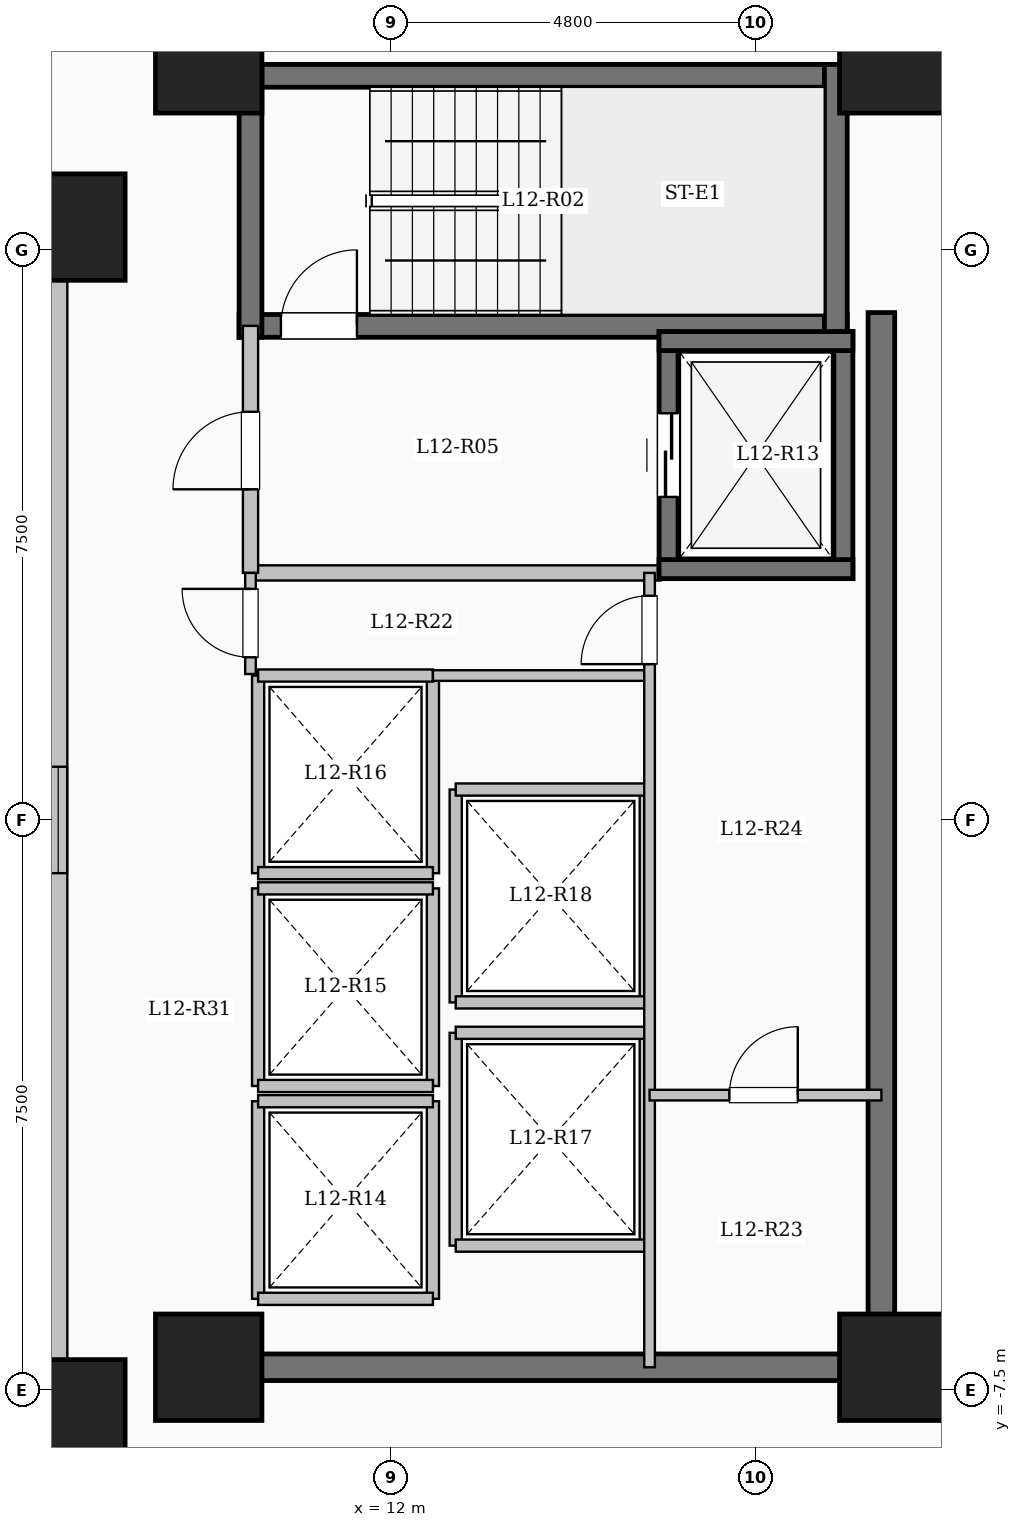
"""IFC4 building model, lengths in metres.
Left out: names, types, materials, properties, quantities, classifications, styles, units other than length and angle.
Written with IfcOpenShell. Run it as: python <this file> out.ifc"""

import sys

from ifc_helpers import new_model, si_unit, direction, frame, frame_2d, origin, origin_2d, place, context, subcontext, project, spatial, rectangle, extrude, element, fill, save


model = new_model("IFC4")
c1 = context("Model", 3, precision=1e-05, world=origin(), true_north=direction((0.0, 1.0)))
c2 = subcontext(c1, "Body", "Model", "MODEL_VIEW")
j1 = project(units=[si_unit("LENGTHUNIT", "METRE"), si_unit("PLANEANGLEUNIT", "RADIAN")], contexts=[c1])
p1 = place(None, origin())
s1 = spatial("IfcSite", under=j1, at=p1, CompositionType="ELEMENT")
p2 = place(p1, origin())
s2 = spatial("IfcBuilding", under=s1, at=p2, CompositionType="ELEMENT")
p3 = place(p2, frame((0.0, 0.0, 47.45)))
s3 = spatial("IfcBuildingStorey", under=s2, at=p3, CompositionType="ELEMENT", Elevation=47.45)
for number, where, z_axis, x_axis in (
    (1, (7.8, -7.8, 0.0), (0.0, 0.0, 1.0), (1.0, 0.0, 0.0)),
    (2, (7.8, 7.8, 0.0), (0.0, 0.0, 1.0), (1.0, 0.0, 0.0)),
    (3, (9.6, -7.2, 0.0), (0.0, 0.0, 1.0), (1.0, 0.0, 0.0)),
    (4, (9.6, 10.0, 0.0), (0.0, 0.0, 1.0), (1.0, 0.0, 0.0)),
    (5, (18.6, -7.2, 0.0), (0.0, 0.0, 1.0), (1.0, 0.0, 0.0)),
    (6, (18.6, 10.0, 0.0), (0.0, 0.0, 1.0), (1.0, 0.0, 0.0)),
):
    element("IfcColumn", number, at=place(p3, frame(where, z_axis=z_axis, x_axis=x_axis)), inside=s3, PredefinedType="COLUMN", context=c2, shape_type="SweptSolid", body=[
        extrude(rectangle(XDim=1.4, YDim=1.4, at=origin_2d()), origin(), (0.0, 0.0, 1.0), 3.35),
    ])
p4 = place(p3, frame((-7.62, -7.62, 0.0), z_axis=(0.0, 0.0, 1.0), x_axis=(1.0, 0.0, 0.0)))
e7 = element("IfcWall", 7, at=p4, inside=s3, PredefinedType="SOLIDWALL", context=c2, shape_type="SweptSolid", body=[
    extrude(rectangle(XDim=15.24, YDim=0.24, at=frame_2d((7.62, 0.0))), origin(), (0.0, 0.0, 1.0), 3.1),
])
p5 = place(p4, frame((6.92, 0.0, 0.95)))
e8 = element("IfcOpeningElement", 8, at=p5, cuts=e7, PredefinedType="OPENING", context=c2, shape_type="SweptSolid", body=[
    extrude(rectangle(XDim=1.4, YDim=1.5, at=frame_2d((0.7, 0.75))), frame((0.0, 0.13, 0.0), z_axis=(0.0, -1.0, 0.0), x_axis=(1.0, 0.0, 0.0)), (0.0, 0.0, 1.0), 0.26),
])
p6 = place(p3, frame((7.62, -7.62, 0.0), z_axis=(0.0, 0.0, 1.0), x_axis=(0.0, 1.0, 0.0)))
e9 = element("IfcWall", 9, at=p6, inside=s3, PredefinedType="SOLIDWALL", context=c2, shape_type="SweptSolid", body=[
    extrude(rectangle(XDim=15.24, YDim=0.24, at=frame_2d((7.62, 0.0))), origin(), (0.0, 0.0, 1.0), 3.1),
])
p7 = place(p6, frame((6.92, 0.0, 0.95)))
e10 = element("IfcOpeningElement", 10, at=p7, cuts=e9, PredefinedType="OPENING", context=c2, shape_type="SweptSolid", body=[
    extrude(rectangle(XDim=1.4, YDim=1.5, at=frame_2d((0.7, 0.75))), frame((0.0, 0.13, 0.0), z_axis=(0.0, -1.0, 0.0), x_axis=(1.0, 0.0, 0.0)), (0.0, 0.0, 1.0), 0.26),
])
p8 = place(p3, frame((7.62, 7.62, 0.0), z_axis=(0.0, 0.0, 1.0), x_axis=(-1.0, 0.0, 0.0)))
e11 = element("IfcWall", 11, at=p8, inside=s3, PredefinedType="SOLIDWALL", context=c2, shape_type="SweptSolid", body=[
    extrude(rectangle(XDim=15.24, YDim=0.24, at=frame_2d((7.62, 0.0))), origin(), (0.0, 0.0, 1.0), 3.1),
])
p9 = place(p8, frame((6.92, 0.0, 0.95)))
e12 = element("IfcOpeningElement", 12, at=p9, cuts=e11, PredefinedType="OPENING", context=c2, shape_type="SweptSolid", body=[
    extrude(rectangle(XDim=1.4, YDim=1.5, at=frame_2d((0.7, 0.75))), frame((0.0, 0.13, 0.0), z_axis=(0.0, -1.0, 0.0), x_axis=(1.0, 0.0, 0.0)), (0.0, 0.0, 1.0), 0.26),
])
p10 = place(p3, frame((10.0, 9.79, 0.0), z_axis=(0.0, 0.0, 1.0), x_axis=(1.0, 0.0, 0.0)))
e13 = element("IfcWall", 13, at=p10, inside=s3, PredefinedType="SHEAR", context=c2, shape_type="SweptSolid", body=[
    extrude(rectangle(XDim=8.0, YDim=0.3, at=frame_2d((4.0, 0.0))), origin(), (0.0, 0.0, 1.0), 3.35),
])
p11 = place(p3, frame((10.0, 6.5, 0.0), z_axis=(0.0, 0.0, 1.0), x_axis=(1.0, 0.0, 0.0)))
e14 = element("IfcWall", 14, at=p11, inside=s3, PredefinedType="SHEAR", context=c2, shape_type="SweptSolid", body=[
    extrude(rectangle(XDim=8.0, YDim=0.3, at=frame_2d((4.0, 0.0))), origin(), (0.0, 0.0, 1.0), 3.35),
])
p12 = place(p11, frame((0.55, 0.0, 0.0)))
e15 = element("IfcOpeningElement", 15, at=p12, cuts=e14, PredefinedType="OPENING", context=c2, shape_type="SweptSolid", body=[
    extrude(rectangle(XDim=1.0, YDim=2.15, at=frame_2d((0.5, 1.075))), frame((0.0, 0.16, 0.0), z_axis=(0.0, -1.0, 0.0), x_axis=(1.0, 0.0, 0.0)), (0.0, 0.0, 1.0), 0.32),
])
for number, where, z_axis, x_axis in (
    (16, (10.15, 6.35, 0.0), (0.0, 0.0, 1.0), (0.0, 1.0, 0.0)),
    (17, (17.85, 6.35, 0.0), (0.0, 0.0, 1.0), (0.0, 1.0, 0.0)),
):
    element("IfcWall", number, at=place(p3, frame(where, z_axis=z_axis, x_axis=x_axis)), inside=s3, PredefinedType="SHEAR", context=c2, shape_type="SweptSolid", body=[
        extrude(rectangle(XDim=3.59, YDim=0.3, at=frame_2d((1.795, 0.0))), origin(), (0.0, 0.0, 1.0), 3.35),
    ])
p13 = place(p3, frame((10.15, 3.25, 0.0), z_axis=(0.0, 0.0, 1.0), x_axis=(1.0, 0.0, 0.0)))
e18 = element("IfcWall", 18, at=p13, inside=s3, PredefinedType="SOLIDWALL", context=c2, shape_type="SweptSolid", body=[
    extrude(rectangle(XDim=5.4, YDim=0.2, at=frame_2d((2.7, 0.0))), origin(), (0.0, 0.0, 1.0), 3.1),
])
p14 = place(p3, frame((10.15, 3.25, 0.0), z_axis=(0.0, 0.0, 1.0), x_axis=(0.0, 1.0, 0.0)))
e19 = element("IfcWall", 19, at=p14, inside=s3, PredefinedType="SOLIDWALL", context=c2, shape_type="SweptSolid", body=[
    extrude(rectangle(XDim=3.25, YDim=0.2, at=frame_2d((1.625, 0.0))), origin(), (0.0, 0.0, 1.0), 3.1),
])
p15 = place(p14, frame((1.1, 0.0, 0.0)))
e20 = element("IfcOpeningElement", 20, at=p15, cuts=e19, PredefinedType="OPENING", context=c2, shape_type="SweptSolid", body=[
    extrude(rectangle(XDim=1.02, YDim=2.15, at=frame_2d((0.51, 1.075))), frame((0.0, 0.11, 0.0), z_axis=(0.0, -1.0, 0.0), x_axis=(1.0, 0.0, 0.0)), (0.0, 0.0, 1.0), 0.22),
])
p16 = place(p3, frame((15.65, 3.175, 0.0), z_axis=(0.0, 0.0, 1.0), x_axis=(0.0, 1.0, 0.0)))
e21 = element("IfcWall", 21, at=p16, inside=s3, PredefinedType="SHEAR", context=c2, shape_type="SweptSolid", body=[
    extrude(rectangle(XDim=3.25, YDim=0.25, at=frame_2d((1.625, 0.0))), origin(), (0.0, 0.0, 1.0), 3.35),
])
p17 = place(p16, frame((1.075, 0.0, 0.0)))
e22 = element("IfcOpeningElement", 22, at=p17, cuts=e21, PredefinedType="OPENING", context=c2, shape_type="SweptSolid", body=[
    extrude(rectangle(XDim=1.1, YDim=2.15, at=frame_2d((0.55, 1.075))), frame((0.0, 0.135, 0.0), z_axis=(0.0, -1.0, 0.0), x_axis=(1.0, 0.0, 0.0)), (0.0, 0.0, 1.0), 0.27),
])
p18 = place(p3, frame((17.95, 3.175, 0.0), z_axis=(0.0, 0.0, 1.0), x_axis=(0.0, 1.0, 0.0)))
e23 = element("IfcWall", 23, at=p18, inside=s3, PredefinedType="SHEAR", context=c2, shape_type="SweptSolid", body=[
    extrude(rectangle(XDim=3.25, YDim=0.25, at=frame_2d((1.625, 0.0))), origin(), (0.0, 0.0, 1.0), 3.35),
])
for number, where, z_axis, x_axis in (
    (24, (15.525, 3.3, 0.0), (0.0, 0.0, 1.0), (1.0, 0.0, 0.0)),
    (25, (15.525, 6.3, 0.0), (0.0, 0.0, 1.0), (1.0, 0.0, 0.0)),
):
    element("IfcWall", number, at=place(p3, frame(where, z_axis=z_axis, x_axis=x_axis)), inside=s3, PredefinedType="SHEAR", context=c2, shape_type="SweptSolid", body=[
        extrude(rectangle(XDim=2.55, YDim=0.25, at=frame_2d((1.275, 0.0))), origin(), (0.0, 0.0, 1.0), 3.35),
    ])
for number, where, z_axis, x_axis in (
    (26, (10.25, -6.3, 0.0), (0.0, 0.0, 1.0), (0.0, 1.0, 0.0)),
    (27, (12.55, -6.3, 0.0), (0.0, 0.0, 1.0), (0.0, 1.0, 0.0)),
):
    element("IfcWall", number, at=place(p3, frame(where, z_axis=z_axis, x_axis=x_axis)), inside=s3, PredefinedType="SOLIDWALL", context=c2, shape_type="SweptSolid", body=[
        extrude(rectangle(XDim=2.6, YDim=0.16, at=frame_2d((1.3, 0.0))), origin(), (0.0, 0.0, 1.0), 3.1),
    ])
for number, where, z_axis, x_axis in (
    (28, (10.25, -6.3, 0.0), (0.0, 0.0, 1.0), (1.0, 0.0, 0.0)),
    (29, (10.25, -3.7, 0.0), (0.0, 0.0, 1.0), (1.0, 0.0, 0.0)),
):
    element("IfcWall", number, at=place(p3, frame(where, z_axis=z_axis, x_axis=x_axis)), inside=s3, PredefinedType="SOLIDWALL", context=c2, shape_type="SweptSolid", body=[
        extrude(rectangle(XDim=2.3, YDim=0.16, at=frame_2d((1.15, 0.0))), origin(), (0.0, 0.0, 1.0), 3.1),
    ])
for number, where, z_axis, x_axis in (
    (30, (10.25, -3.5, 0.0), (0.0, 0.0, 1.0), (0.0, 1.0, 0.0)),
    (31, (12.55, -3.5, 0.0), (0.0, 0.0, 1.0), (0.0, 1.0, 0.0)),
):
    element("IfcWall", number, at=place(p3, frame(where, z_axis=z_axis, x_axis=x_axis)), inside=s3, PredefinedType="SOLIDWALL", context=c2, shape_type="SweptSolid", body=[
        extrude(rectangle(XDim=2.6, YDim=0.16, at=frame_2d((1.3, 0.0))), origin(), (0.0, 0.0, 1.0), 3.1),
    ])
for number, where, z_axis, x_axis in (
    (32, (10.25, -3.5, 0.0), (0.0, 0.0, 1.0), (1.0, 0.0, 0.0)),
    (33, (10.25, -0.9, 0.0), (0.0, 0.0, 1.0), (1.0, 0.0, 0.0)),
):
    element("IfcWall", number, at=place(p3, frame(where, z_axis=z_axis, x_axis=x_axis)), inside=s3, PredefinedType="SOLIDWALL", context=c2, shape_type="SweptSolid", body=[
        extrude(rectangle(XDim=2.3, YDim=0.16, at=frame_2d((1.15, 0.0))), origin(), (0.0, 0.0, 1.0), 3.1),
    ])
for number, where, z_axis, x_axis in (
    (34, (10.25, -0.7, 0.0), (0.0, 0.0, 1.0), (0.0, 1.0, 0.0)),
    (35, (12.55, -0.7, 0.0), (0.0, 0.0, 1.0), (0.0, 1.0, 0.0)),
):
    element("IfcWall", number, at=place(p3, frame(where, z_axis=z_axis, x_axis=x_axis)), inside=s3, PredefinedType="SOLIDWALL", context=c2, shape_type="SweptSolid", body=[
        extrude(rectangle(XDim=2.6, YDim=0.16, at=frame_2d((1.3, 0.0))), origin(), (0.0, 0.0, 1.0), 3.1),
    ])
for number, where, z_axis, x_axis in (
    (36, (10.25, -0.7, 0.0), (0.0, 0.0, 1.0), (1.0, 0.0, 0.0)),
    (37, (10.25, 1.9, 0.0), (0.0, 0.0, 1.0), (1.0, 0.0, 0.0)),
):
    element("IfcWall", number, at=place(p3, frame(where, z_axis=z_axis, x_axis=x_axis)), inside=s3, PredefinedType="SOLIDWALL", context=c2, shape_type="SweptSolid", body=[
        extrude(rectangle(XDim=2.3, YDim=0.16, at=frame_2d((1.15, 0.0))), origin(), (0.0, 0.0, 1.0), 3.1),
    ])
for number, where, z_axis, x_axis in (
    (38, (12.85, -5.6, 0.0), (0.0, 0.0, 1.0), (0.0, 1.0, 0.0)),
    (39, (15.35, -5.6, 0.0), (0.0, 0.0, 1.0), (0.0, 1.0, 0.0)),
):
    element("IfcWall", number, at=place(p3, frame(where, z_axis=z_axis, x_axis=x_axis)), inside=s3, PredefinedType="SOLIDWALL", context=c2, shape_type="SweptSolid", body=[
        extrude(rectangle(XDim=2.8, YDim=0.16, at=frame_2d((1.4, 0.0))), origin(), (0.0, 0.0, 1.0), 3.1),
    ])
for number, where, z_axis, x_axis in (
    (40, (12.85, -5.6, 0.0), (0.0, 0.0, 1.0), (1.0, 0.0, 0.0)),
    (41, (12.85, -2.8, 0.0), (0.0, 0.0, 1.0), (1.0, 0.0, 0.0)),
):
    element("IfcWall", number, at=place(p3, frame(where, z_axis=z_axis, x_axis=x_axis)), inside=s3, PredefinedType="SOLIDWALL", context=c2, shape_type="SweptSolid", body=[
        extrude(rectangle(XDim=2.5, YDim=0.16, at=frame_2d((1.25, 0.0))), origin(), (0.0, 0.0, 1.0), 3.1),
    ])
for number, where, z_axis, x_axis in (
    (42, (12.85, -2.4, 0.0), (0.0, 0.0, 1.0), (0.0, 1.0, 0.0)),
    (43, (15.35, -2.4, 0.0), (0.0, 0.0, 1.0), (0.0, 1.0, 0.0)),
):
    element("IfcWall", number, at=place(p3, frame(where, z_axis=z_axis, x_axis=x_axis)), inside=s3, PredefinedType="SOLIDWALL", context=c2, shape_type="SweptSolid", body=[
        extrude(rectangle(XDim=2.8, YDim=0.16, at=frame_2d((1.4, 0.0))), origin(), (0.0, 0.0, 1.0), 3.1),
    ])
for number, where, z_axis, x_axis in (
    (44, (12.85, -2.4, 0.0), (0.0, 0.0, 1.0), (1.0, 0.0, 0.0)),
    (45, (12.85, 0.4, 0.0), (0.0, 0.0, 1.0), (1.0, 0.0, 0.0)),
):
    element("IfcWall", number, at=place(p3, frame(where, z_axis=z_axis, x_axis=x_axis)), inside=s3, PredefinedType="SOLIDWALL", context=c2, shape_type="SweptSolid", body=[
        extrude(rectangle(XDim=2.5, YDim=0.16, at=frame_2d((1.25, 0.0))), origin(), (0.0, 0.0, 1.0), 3.1),
    ])
p19 = place(p3, frame((18.45, -7.375, 0.0), z_axis=(0.0, 0.0, 1.0), x_axis=(0.0, 1.0, 0.0)))
e46 = element("IfcWall", 46, at=p19, inside=s3, PredefinedType="SHEAR", context=c2, shape_type="SweptSolid", body=[
    extrude(rectangle(XDim=14.05, YDim=0.35, at=frame_2d((7.025, 0.0))), origin(), (0.0, 0.0, 1.0), 3.35),
])
p20 = place(p3, frame((10.075, -7.2, 0.0), z_axis=(0.0, 0.0, 1.0), x_axis=(1.0, 0.0, 0.0)))
e47 = element("IfcWall", 47, at=p20, inside=s3, PredefinedType="SHEAR", context=c2, shape_type="SweptSolid", body=[
    extrude(rectangle(XDim=8.55, YDim=0.35, at=frame_2d((4.275, 0.0))), origin(), (0.0, 0.0, 1.0), 3.35),
])
p21 = place(p3, frame((12.55, 1.9, 0.0), z_axis=(0.0, 0.0, 1.0), x_axis=(1.0, 0.0, 0.0)))
e48 = element("IfcWall", 48, at=p21, inside=s3, PredefinedType="PARTITIONING", context=c2, shape_type="SweptSolid", body=[
    extrude(rectangle(XDim=2.85, YDim=0.14, at=frame_2d((1.425, 0.0))), origin(), (0.0, 0.0, 1.0), 3.1),
])
p22 = place(p3, frame((10.15, 1.92, 0.0), z_axis=(0.0, 0.0, 1.0), x_axis=(0.0, 1.0, 0.0)))
e49 = element("IfcWall", 49, at=p22, inside=s3, PredefinedType="PARTITIONING", context=c2, shape_type="SweptSolid", body=[
    extrude(rectangle(XDim=1.33, YDim=0.14, at=frame_2d((0.665, 0.0))), origin(), (0.0, 0.0, 1.0), 3.1),
])
p23 = place(p22, frame((0.22, 0.0, 0.0)))
e50 = element("IfcOpeningElement", 50, at=p23, cuts=e49, PredefinedType="OPENING", context=c2, shape_type="SweptSolid", body=[
    extrude(rectangle(XDim=0.9, YDim=2.08, at=frame_2d((0.45, 1.04))), frame((0.0, 0.08, 0.0), z_axis=(0.0, -1.0, 0.0), x_axis=(1.0, 0.0, 0.0)), (0.0, 0.0, 1.0), 0.16),
])
p24 = place(p3, frame((15.4, -7.2, 0.0), z_axis=(0.0, 0.0, 1.0), x_axis=(0.0, 1.0, 0.0)))
e51 = element("IfcWall", 51, at=p24, inside=s3, PredefinedType="PARTITIONING", context=c2, shape_type="SweptSolid", body=[
    extrude(rectangle(XDim=10.45, YDim=0.14, at=frame_2d((5.225, 0.0))), origin(), (0.0, 0.0, 1.0), 3.1),
])
p25 = place(p24, frame((9.25, 0.0, 0.0)))
e52 = element("IfcOpeningElement", 52, at=p25, cuts=e51, PredefinedType="OPENING", context=c2, shape_type="SweptSolid", body=[
    extrude(rectangle(XDim=0.9, YDim=2.08, at=frame_2d((0.45, 1.04))), frame((0.0, 0.08, 0.0), z_axis=(0.0, -1.0, 0.0), x_axis=(1.0, 0.0, 0.0)), (0.0, 0.0, 1.0), 0.16),
])
p26 = place(p3, frame((15.4, -3.62, 0.0), z_axis=(0.0, 0.0, 1.0), x_axis=(1.0, 0.0, 0.0)))
e53 = element("IfcWall", 53, at=p26, inside=s3, PredefinedType="PARTITIONING", context=c2, shape_type="SweptSolid", body=[
    extrude(rectangle(XDim=3.05, YDim=0.14, at=frame_2d((1.525, 0.0))), origin(), (0.0, 0.0, 1.0), 3.1),
])
p27 = place(p26, frame((1.05, 0.0, 0.0)))
e54 = element("IfcOpeningElement", 54, at=p27, cuts=e53, PredefinedType="OPENING", context=c2, shape_type="SweptSolid", body=[
    extrude(rectangle(XDim=0.9, YDim=2.08, at=frame_2d((0.45, 1.04))), frame((0.0, 0.08, 0.0), z_axis=(0.0, -1.0, 0.0), x_axis=(1.0, 0.0, 0.0)), (0.0, 0.0, 1.0), 0.16),
])
p28 = place(p7, origin())
e55 = element("IfcWindow", 55, at=p28, inside=s3, PartitioningType="SINGLE_PANEL", PredefinedType="WINDOW", context=c2, shape_type="SweptSolid", body=[
    extrude(rectangle(XDim=1.4, YDim=1.5, at=frame_2d((0.7, 0.75))), frame((0.0, 0.03, 0.0), z_axis=(0.0, -1.0, 0.0), x_axis=(1.0, 0.0, 0.0)), (0.0, 0.0, 1.0), 0.06),
])
fill(e10, e55)
p29 = place(p12, origin())
e56 = element("IfcDoor", 56, at=p29, inside=s3, OperationType="SINGLE_SWING_RIGHT", PredefinedType="DOOR", context=c2, shape_type="SweptSolid", body=[
    extrude(rectangle(XDim=1.0, YDim=2.15, at=frame_2d((0.5, 1.075))), frame((0.0, 0.025, 0.0), z_axis=(0.0, -1.0, 0.0), x_axis=(1.0, 0.0, 0.0)), (0.0, 0.0, 1.0), 0.05),
])
fill(e15, e56)
p30 = place(p15, origin())
e57 = element("IfcDoor", 57, at=p30, inside=s3, OperationType="SINGLE_SWING_LEFT", PredefinedType="DOOR", context=c2, shape_type="SweptSolid", body=[
    extrude(rectangle(XDim=1.02, YDim=2.15, at=frame_2d((0.51, 1.075))), frame((0.0, 0.025, 0.0), z_axis=(0.0, -1.0, 0.0), x_axis=(1.0, 0.0, 0.0)), (0.0, 0.0, 1.0), 0.05),
])
fill(e20, e57)
p31 = place(p17, origin())
e58 = element("IfcDoor", 58, at=p31, inside=s3, OperationType="SLIDING_TO_LEFT", PredefinedType="DOOR", context=c2, shape_type="SweptSolid", body=[
    extrude(rectangle(XDim=1.1, YDim=2.15, at=frame_2d((0.55, 1.075))), frame((0.0, 0.025, 0.0), z_axis=(0.0, -1.0, 0.0), x_axis=(1.0, 0.0, 0.0)), (0.0, 0.0, 1.0), 0.05),
])
fill(e22, e58)
p32 = place(p23, origin())
e59 = element("IfcDoor", 59, at=p32, inside=s3, OperationType="SINGLE_SWING_RIGHT", PredefinedType="DOOR", context=c2, shape_type="SweptSolid", body=[
    extrude(rectangle(XDim=0.9, YDim=2.08, at=frame_2d((0.45, 1.04))), frame((0.0, 0.025, 0.0), z_axis=(0.0, -1.0, 0.0), x_axis=(1.0, 0.0, 0.0)), (0.0, 0.0, 1.0), 0.05),
])
fill(e50, e59)
p33 = place(p25, origin())
e60 = element("IfcDoor", 60, at=p33, inside=s3, OperationType="SINGLE_SWING_LEFT", PredefinedType="DOOR", context=c2, shape_type="SweptSolid", body=[
    extrude(rectangle(XDim=0.9, YDim=2.08, at=frame_2d((0.45, 1.04))), frame((0.0, 0.025, 0.0), z_axis=(0.0, -1.0, 0.0), x_axis=(1.0, 0.0, 0.0)), (0.0, 0.0, 1.0), 0.05),
])
fill(e52, e60)
p34 = place(p27, origin())
e61 = element("IfcDoor", 61, at=p34, inside=s3, OperationType="SINGLE_SWING_RIGHT", PredefinedType="DOOR", context=c2, shape_type="SweptSolid", body=[
    extrude(rectangle(XDim=0.9, YDim=2.08, at=frame_2d((0.45, 1.04))), frame((0.0, 0.025, 0.0), z_axis=(0.0, -1.0, 0.0), x_axis=(1.0, 0.0, 0.0)), (0.0, 0.0, 1.0), 0.05),
])
fill(e54, e61)
save(model, sys.argv[1])
